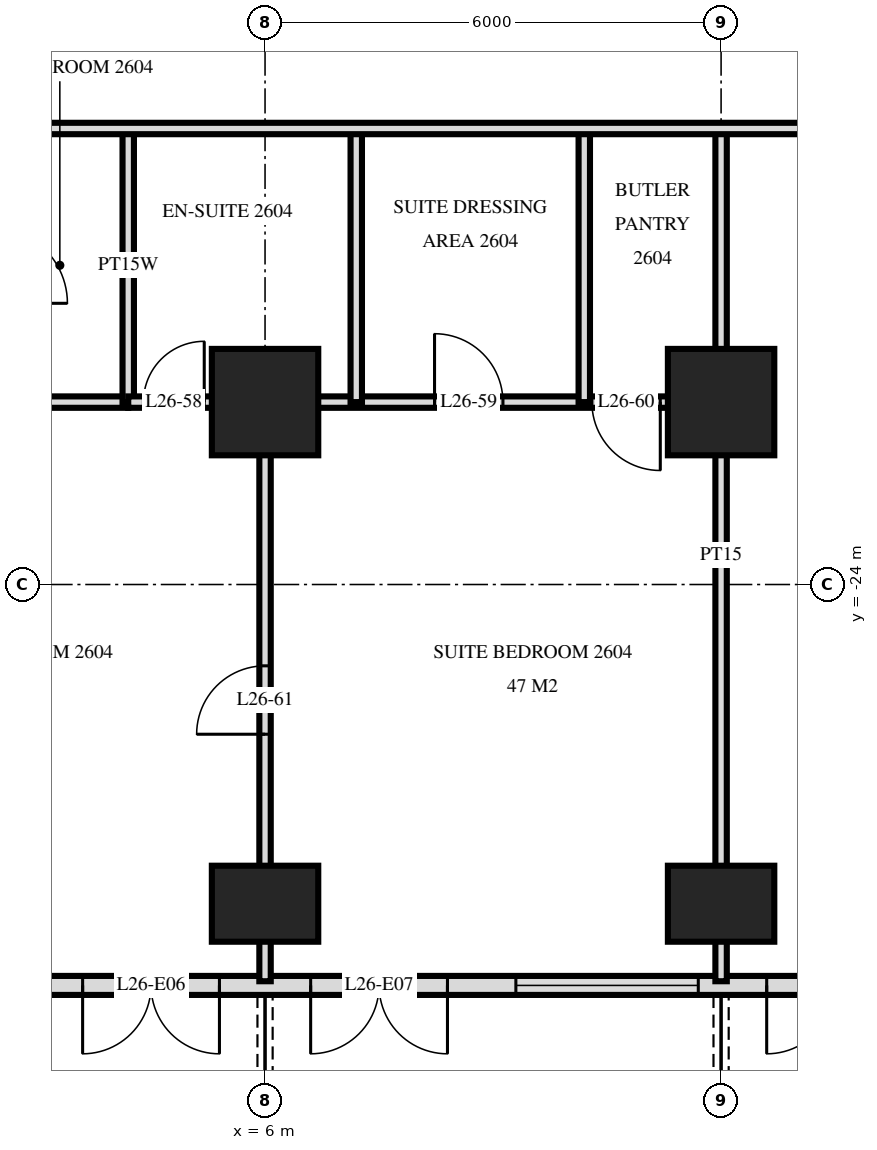
"""IFC4 building model, lengths in metres.
Left out: names, types, materials, properties, quantities, classifications, styles, units other than length and angle.
Written with IfcOpenShell. Run it as: python <this file> out.ifc"""

import sys

from ifc_helpers import new_model, si_unit, direction, frame, frame_2d, origin, origin_2d, place, context, subcontext, project, spatial, rectangle, extrude, element, fill, save


model = new_model("IFC4")
c1 = context("Model", 3, precision=1e-05, world=origin(), true_north=direction((0.0, 1.0)))
c2 = subcontext(c1, "Body", "Model", "MODEL_VIEW")
j1 = project(units=[si_unit("LENGTHUNIT", "METRE"), si_unit("PLANEANGLEUNIT", "RADIAN")], contexts=[c1])
p1 = place(None, origin())
s1 = spatial("IfcSite", under=j1, at=p1, CompositionType="ELEMENT")
p2 = place(p1, origin())
s2 = spatial("IfcBuilding", under=s1, at=p2, CompositionType="ELEMENT")
p3 = place(p2, frame((0.0, 0.0, 103.2)))
s3 = spatial("IfcBuildingStorey", under=s2, at=p3, CompositionType="ELEMENT", Elevation=103.2)
p4 = place(p3, frame((6.0, -28.2, 0.0), z_axis=(0.0, 0.0, 1.0), x_axis=(1.0, 0.0, 0.0)))
e1 = element("IfcColumn", 1, at=p4, inside=s3, PredefinedType="COLUMN", context=c2, shape_type="SweptSolid", body=[
    extrude(rectangle(XDim=1.4, YDim=1.0, at=origin_2d()), origin(), (0.0, 0.0, 1.0), 3.6),
])
p5 = place(p3, frame((6.0, -21.6, 0.0), z_axis=(0.0, 0.0, 1.0), x_axis=(1.0, 0.0, 0.0)))
e2 = element("IfcColumn", 2, at=p5, inside=s3, PredefinedType="COLUMN", context=c2, shape_type="SweptSolid", body=[
    extrude(rectangle(XDim=1.4, YDim=1.4, at=origin_2d()), origin(), (0.0, 0.0, 1.0), 3.6),
])
p6 = place(p3, frame((12.0, -28.2, 0.0), z_axis=(0.0, 0.0, 1.0), x_axis=(1.0, 0.0, 0.0)))
e3 = element("IfcColumn", 3, at=p6, inside=s3, PredefinedType="COLUMN", context=c2, shape_type="SweptSolid", body=[
    extrude(rectangle(XDim=1.4, YDim=1.0, at=origin_2d()), origin(), (0.0, 0.0, 1.0), 3.6),
])
p7 = place(p3, frame((12.0, -21.6, 0.0), z_axis=(0.0, 0.0, 1.0), x_axis=(1.0, 0.0, 0.0)))
e4 = element("IfcColumn", 4, at=p7, inside=s3, PredefinedType="COLUMN", context=c2, shape_type="SweptSolid", body=[
    extrude(rectangle(XDim=1.4, YDim=1.4, at=origin_2d()), origin(), (0.0, 0.0, 1.0), 3.6),
])
p8 = place(p3, frame((-28.775, -29.275, 0.0), z_axis=(0.0, 0.0, 1.0), x_axis=(1.0, 0.0, 0.0)))
e5 = element("IfcWall", 5, at=p8, inside=s3, PredefinedType="SOLIDWALL", context=c2, shape_type="SweptSolid", body=[
    extrude(rectangle(XDim=57.551, YDim=0.25, at=frame_2d((28.775, 0.0))), origin(), (0.0, 0.0, 1.0), 3.3),
])
p9 = place(p8, frame((0.575, 0.0, 0.0)))
e6 = element("IfcOpeningElement", 6, at=p9, cuts=e5, PredefinedType="OPENING", context=c2, shape_type="SweptSolid", body=[
    extrude(rectangle(XDim=1.8, YDim=2.4, at=frame_2d((0.9, 1.2))), frame((0.0, 0.135, 0.0), z_axis=(0.0, -1.0, 0.0), x_axis=(1.0, 0.0, 0.0)), (0.0, 0.0, 1.0), 0.27),
])
p10 = place(p8, frame((5.375, 0.0, 0.0)))
e7 = element("IfcOpeningElement", 7, at=p10, cuts=e5, PredefinedType="OPENING", context=c2, shape_type="SweptSolid", body=[
    extrude(rectangle(XDim=1.8, YDim=2.4, at=frame_2d((0.9, 1.2))), frame((0.0, 0.135, 0.0), z_axis=(0.0, -1.0, 0.0), x_axis=(1.0, 0.0, 0.0)), (0.0, 0.0, 1.0), 0.27),
])
p11 = place(p8, frame((8.075, 0.0, 0.3)))
e8 = element("IfcOpeningElement", 8, at=p11, cuts=e5, PredefinedType="OPENING", context=c2, shape_type="SweptSolid", body=[
    extrude(rectangle(XDim=2.4, YDim=2.1, at=frame_2d((1.2, 1.05))), frame((0.0, 0.135, 0.0), z_axis=(0.0, -1.0, 0.0), x_axis=(1.0, 0.0, 0.0)), (0.0, 0.0, 1.0), 0.27),
])
p12 = place(p8, frame((11.375, 0.0, 0.0)))
e9 = element("IfcOpeningElement", 9, at=p12, cuts=e5, PredefinedType="OPENING", context=c2, shape_type="SweptSolid", body=[
    extrude(rectangle(XDim=1.8, YDim=2.4, at=frame_2d((0.9, 1.2))), frame((0.0, 0.135, 0.0), z_axis=(0.0, -1.0, 0.0), x_axis=(1.0, 0.0, 0.0)), (0.0, 0.0, 1.0), 0.27),
])
p13 = place(p8, frame((14.075, 0.0, 0.3)))
e10 = element("IfcOpeningElement", 10, at=p13, cuts=e5, PredefinedType="OPENING", context=c2, shape_type="SweptSolid", body=[
    extrude(rectangle(XDim=2.4, YDim=2.1, at=frame_2d((1.2, 1.05))), frame((0.0, 0.135, 0.0), z_axis=(0.0, -1.0, 0.0), x_axis=(1.0, 0.0, 0.0)), (0.0, 0.0, 1.0), 0.27),
])
p14 = place(p8, frame((17.375, 0.0, 0.0)))
e11 = element("IfcOpeningElement", 11, at=p14, cuts=e5, PredefinedType="OPENING", context=c2, shape_type="SweptSolid", body=[
    extrude(rectangle(XDim=1.8, YDim=2.4, at=frame_2d((0.9, 1.2))), frame((0.0, 0.135, 0.0), z_axis=(0.0, -1.0, 0.0), x_axis=(1.0, 0.0, 0.0)), (0.0, 0.0, 1.0), 0.27),
])
p15 = place(p8, frame((20.075, 0.0, 0.3)))
e12 = element("IfcOpeningElement", 12, at=p15, cuts=e5, PredefinedType="OPENING", context=c2, shape_type="SweptSolid", body=[
    extrude(rectangle(XDim=2.4, YDim=2.1, at=frame_2d((1.2, 1.05))), frame((0.0, 0.135, 0.0), z_axis=(0.0, -1.0, 0.0), x_axis=(1.0, 0.0, 0.0)), (0.0, 0.0, 1.0), 0.27),
])
p16 = place(p8, frame((23.075, 0.0, 0.3)))
e13 = element("IfcOpeningElement", 13, at=p16, cuts=e5, PredefinedType="OPENING", context=c2, shape_type="SweptSolid", body=[
    extrude(rectangle(XDim=2.4, YDim=2.1, at=frame_2d((1.2, 1.05))), frame((0.0, 0.135, 0.0), z_axis=(0.0, -1.0, 0.0), x_axis=(1.0, 0.0, 0.0)), (0.0, 0.0, 1.0), 0.27),
])
p17 = place(p8, frame((26.375, 0.0, 0.0)))
e14 = element("IfcOpeningElement", 14, at=p17, cuts=e5, PredefinedType="OPENING", context=c2, shape_type="SweptSolid", body=[
    extrude(rectangle(XDim=1.8, YDim=2.4, at=frame_2d((0.9, 1.2))), frame((0.0, 0.135, 0.0), z_axis=(0.0, -1.0, 0.0), x_axis=(1.0, 0.0, 0.0)), (0.0, 0.0, 1.0), 0.27),
])
p18 = place(p8, frame((29.075, 0.0, 0.3)))
e15 = element("IfcOpeningElement", 15, at=p18, cuts=e5, PredefinedType="OPENING", context=c2, shape_type="SweptSolid", body=[
    extrude(rectangle(XDim=2.4, YDim=2.1, at=frame_2d((1.2, 1.05))), frame((0.0, 0.135, 0.0), z_axis=(0.0, -1.0, 0.0), x_axis=(1.0, 0.0, 0.0)), (0.0, 0.0, 1.0), 0.27),
])
p19 = place(p8, frame((32.375, 0.0, 0.0)))
e16 = element("IfcOpeningElement", 16, at=p19, cuts=e5, PredefinedType="OPENING", context=c2, shape_type="SweptSolid", body=[
    extrude(rectangle(XDim=1.8, YDim=2.4, at=frame_2d((0.9, 1.2))), frame((0.0, 0.135, 0.0), z_axis=(0.0, -1.0, 0.0), x_axis=(1.0, 0.0, 0.0)), (0.0, 0.0, 1.0), 0.27),
])
p20 = place(p8, frame((35.375, 0.0, 0.0)))
e17 = element("IfcOpeningElement", 17, at=p20, cuts=e5, PredefinedType="OPENING", context=c2, shape_type="SweptSolid", body=[
    extrude(rectangle(XDim=1.8, YDim=2.4, at=frame_2d((0.9, 1.2))), frame((0.0, 0.135, 0.0), z_axis=(0.0, -1.0, 0.0), x_axis=(1.0, 0.0, 0.0)), (0.0, 0.0, 1.0), 0.27),
])
p21 = place(p8, frame((38.075, 0.0, 0.3)))
e18 = element("IfcOpeningElement", 18, at=p21, cuts=e5, PredefinedType="OPENING", context=c2, shape_type="SweptSolid", body=[
    extrude(rectangle(XDim=2.4, YDim=2.1, at=frame_2d((1.2, 1.05))), frame((0.0, 0.135, 0.0), z_axis=(0.0, -1.0, 0.0), x_axis=(1.0, 0.0, 0.0)), (0.0, 0.0, 1.0), 0.27),
])
p22 = place(p8, frame((41.375, 0.0, 0.0)))
e19 = element("IfcOpeningElement", 19, at=p22, cuts=e5, PredefinedType="OPENING", context=c2, shape_type="SweptSolid", body=[
    extrude(rectangle(XDim=1.8, YDim=2.4, at=frame_2d((0.9, 1.2))), frame((0.0, 0.135, 0.0), z_axis=(0.0, -1.0, 0.0), x_axis=(1.0, 0.0, 0.0)), (0.0, 0.0, 1.0), 0.27),
])
p23 = place(p8, frame((44.075, 0.0, 0.3)))
e20 = element("IfcOpeningElement", 20, at=p23, cuts=e5, PredefinedType="OPENING", context=c2, shape_type="SweptSolid", body=[
    extrude(rectangle(XDim=2.4, YDim=2.1, at=frame_2d((1.2, 1.05))), frame((0.0, 0.135, 0.0), z_axis=(0.0, -1.0, 0.0), x_axis=(1.0, 0.0, 0.0)), (0.0, 0.0, 1.0), 0.27),
])
p24 = place(p8, frame((47.075, 0.0, 0.3)))
e21 = element("IfcOpeningElement", 21, at=p24, cuts=e5, PredefinedType="OPENING", context=c2, shape_type="SweptSolid", body=[
    extrude(rectangle(XDim=2.4, YDim=2.1, at=frame_2d((1.2, 1.05))), frame((0.0, 0.135, 0.0), z_axis=(0.0, -1.0, 0.0), x_axis=(1.0, 0.0, 0.0)), (0.0, 0.0, 1.0), 0.27),
])
p25 = place(p8, frame((50.375, 0.0, 0.0)))
e22 = element("IfcOpeningElement", 22, at=p25, cuts=e5, PredefinedType="OPENING", context=c2, shape_type="SweptSolid", body=[
    extrude(rectangle(XDim=1.8, YDim=2.4, at=frame_2d((0.9, 1.2))), frame((0.0, 0.135, 0.0), z_axis=(0.0, -1.0, 0.0), x_axis=(1.0, 0.0, 0.0)), (0.0, 0.0, 1.0), 0.27),
])
p26 = place(p8, frame((53.375, 0.0, 0.0)))
e23 = element("IfcOpeningElement", 23, at=p26, cuts=e5, PredefinedType="OPENING", context=c2, shape_type="SweptSolid", body=[
    extrude(rectangle(XDim=1.8, YDim=2.4, at=frame_2d((0.9, 1.2))), frame((0.0, 0.135, 0.0), z_axis=(0.0, -1.0, 0.0), x_axis=(1.0, 0.0, 0.0)), (0.0, 0.0, 1.0), 0.27),
])
p27 = place(p3, frame((12.0, -29.22, 0.0), z_axis=(0.0, 0.0, 1.0), x_axis=(0.0, 1.0, 0.0)))
e24 = element("IfcWall", 24, at=p27, inside=s3, PredefinedType="PARTITIONING", context=c2, shape_type="SweptSolid", body=[
    extrude(rectangle(XDim=11.22, YDim=0.15, at=frame_2d((5.61, 0.0))), origin(), (0.0, 0.0, 1.0), 3.32),
])
for number, where, z_axis, x_axis in (
    (25, (10.2, -21.6, 0.0), (0.0, 0.0, 1.0), (0.0, 1.0, 0.0)),
    (26, (7.2, -21.6, 0.0), (0.0, 0.0, 1.0), (0.0, 1.0, 0.0)),
):
    element("IfcWall", number, at=place(p3, frame(where, z_axis=z_axis, x_axis=x_axis)), inside=s3, PredefinedType="PARTITIONING", context=c2, shape_type="SweptSolid", body=[
        extrude(rectangle(XDim=3.6, YDim=0.15, at=frame_2d((1.8, 0.0))), origin(), (0.0, 0.0, 1.0), 3.32),
    ])
p28 = place(p3, frame((6.0, -29.22, 0.0), z_axis=(0.0, 0.0, 1.0), x_axis=(0.0, 1.0, 0.0)))
e27 = element("IfcWall", 27, at=p28, inside=s3, PredefinedType="PARTITIONING", context=c2, shape_type="SweptSolid", body=[
    extrude(rectangle(XDim=7.62, YDim=0.15, at=frame_2d((3.81, 0.0))), origin(), (0.0, 0.0, 1.0), 3.32),
])
p29 = place(p28, frame((3.25, 0.0, 0.0)))
e28 = element("IfcOpeningElement", 28, at=p29, cuts=e27, PredefinedType="OPENING", context=c2, shape_type="SweptSolid", body=[
    extrude(rectangle(XDim=0.9, YDim=2.1, at=frame_2d((0.45, 1.05))), frame((0.0, 0.085, 0.0), z_axis=(0.0, -1.0, 0.0), x_axis=(1.0, 0.0, 0.0)), (0.0, 0.0, 1.0), 0.17),
])
p30 = place(p3, frame((4.2, -21.6, 0.0), z_axis=(0.0, 0.0, 1.0), x_axis=(0.0, 1.0, 0.0)))
e29 = element("IfcWall", 29, at=p30, inside=s3, PredefinedType="PLUMBINGWALL", context=c2, shape_type="SweptSolid", body=[
    extrude(rectangle(XDim=3.6, YDim=0.15, at=frame_2d((1.8, 0.0))), origin(), (0.0, 0.0, 1.0), 3.32),
])
p31 = place(p3, frame((4.2, -21.6, 0.0), z_axis=(0.0, 0.0, 1.0), x_axis=(1.0, 0.0, 0.0)))
e30 = element("IfcWall", 30, at=p31, inside=s3, PredefinedType="PARTITIONING", context=c2, shape_type="SweptSolid", body=[
    extrude(rectangle(XDim=7.8, YDim=0.15, at=frame_2d((3.9, 0.0))), origin(), (0.0, 0.0, 1.0), 3.32),
])
p32 = place(p31, frame((0.2, 0.0, 0.0)))
e31 = element("IfcOpeningElement", 31, at=p32, cuts=e30, PredefinedType="OPENING", context=c2, shape_type="SweptSolid", body=[
    extrude(rectangle(XDim=0.8, YDim=2.1, at=frame_2d((0.4, 1.05))), frame((0.0, 0.085, 0.0), z_axis=(0.0, -1.0, 0.0), x_axis=(1.0, 0.0, 0.0)), (0.0, 0.0, 1.0), 0.17),
])
p33 = place(p31, frame((4.03, 0.0, 0.0)))
e32 = element("IfcOpeningElement", 32, at=p33, cuts=e30, PredefinedType="OPENING", context=c2, shape_type="SweptSolid", body=[
    extrude(rectangle(XDim=0.9, YDim=2.1, at=frame_2d((0.45, 1.05))), frame((0.0, 0.085, 0.0), z_axis=(0.0, -1.0, 0.0), x_axis=(1.0, 0.0, 0.0)), (0.0, 0.0, 1.0), 0.17),
])
p34 = place(p31, frame((6.1, 0.0, 0.0)))
e33 = element("IfcOpeningElement", 33, at=p34, cuts=e30, PredefinedType="OPENING", context=c2, shape_type="SweptSolid", body=[
    extrude(rectangle(XDim=0.9, YDim=2.1, at=frame_2d((0.45, 1.05))), frame((0.0, 0.085, 0.0), z_axis=(0.0, -1.0, 0.0), x_axis=(1.0, 0.0, 0.0)), (0.0, 0.0, 1.0), 0.17),
])
p35 = place(p3, frame((2.4, -21.6, 0.0), z_axis=(0.0, 0.0, 1.0), x_axis=(1.0, 0.0, 0.0)))
e34 = element("IfcWall", 34, at=p35, inside=s3, PredefinedType="PLUMBINGWALL", context=c2, shape_type="SweptSolid", body=[
    extrude(rectangle(XDim=1.8, YDim=0.15, at=frame_2d((0.9, 0.0))), origin(), (0.0, 0.0, 1.0), 3.32),
])
p36 = place(p3, frame((-33.12, -18.0, 0.0), z_axis=(0.0, 0.0, 1.0), x_axis=(1.0, 0.0, 0.0)))
e35 = element("IfcWall", 35, at=p36, inside=s3, PredefinedType="PARTITIONING", context=c2, shape_type="SweptSolid", body=[
    extrude(rectangle(XDim=66.24, YDim=0.15, at=frame_2d((33.12, 0.0))), origin(), (0.0, 0.0, 1.0), 3.32),
])
p37 = place(p36, frame((14.02, 0.0, 0.0)))
e36 = element("IfcOpeningElement", 36, at=p37, cuts=e35, PredefinedType="OPENING", context=c2, shape_type="SweptSolid", body=[
    extrude(rectangle(XDim=1.0, YDim=2.1, at=frame_2d((0.5, 1.05))), frame((0.0, 0.085, 0.0), z_axis=(0.0, -1.0, 0.0), x_axis=(1.0, 0.0, 0.0)), (0.0, 0.0, 1.0), 0.17),
])
p38 = place(p36, frame((18.82, 0.0, 0.0)))
e37 = element("IfcOpeningElement", 37, at=p38, cuts=e35, PredefinedType="OPENING", context=c2, shape_type="SweptSolid", body=[
    extrude(rectangle(XDim=1.0, YDim=2.1, at=frame_2d((0.5, 1.05))), frame((0.0, 0.085, 0.0), z_axis=(0.0, -1.0, 0.0), x_axis=(1.0, 0.0, 0.0)), (0.0, 0.0, 1.0), 0.17),
])
p39 = place(p36, frame((30.27, 0.0, 0.0)))
e38 = element("IfcOpeningElement", 38, at=p39, cuts=e35, PredefinedType="OPENING", context=c2, shape_type="SweptSolid", body=[
    extrude(rectangle(XDim=1.0, YDim=2.1, at=frame_2d((0.5, 1.05))), frame((0.0, 0.085, 0.0), z_axis=(0.0, -1.0, 0.0), x_axis=(1.0, 0.0, 0.0)), (0.0, 0.0, 1.0), 0.17),
])
p40 = place(p36, frame((33.82, 0.0, 0.0)))
e39 = element("IfcOpeningElement", 39, at=p40, cuts=e35, PredefinedType="OPENING", context=c2, shape_type="SweptSolid", body=[
    extrude(rectangle(XDim=1.0, YDim=2.1, at=frame_2d((0.5, 1.05))), frame((0.0, 0.085, 0.0), z_axis=(0.0, -1.0, 0.0), x_axis=(1.0, 0.0, 0.0)), (0.0, 0.0, 1.0), 0.17),
])
p41 = place(p36, frame((46.27, 0.0, 0.0)))
e40 = element("IfcOpeningElement", 40, at=p41, cuts=e35, PredefinedType="OPENING", context=c2, shape_type="SweptSolid", body=[
    extrude(rectangle(XDim=1.0, YDim=2.1, at=frame_2d((0.5, 1.05))), frame((0.0, 0.085, 0.0), z_axis=(0.0, -1.0, 0.0), x_axis=(1.0, 0.0, 0.0)), (0.0, 0.0, 1.0), 0.17),
])
p42 = place(p36, frame((6.07, 0.0, 0.0)))
e41 = element("IfcOpeningElement", 41, at=p42, cuts=e35, PredefinedType="OPENING", context=c2, shape_type="SweptSolid", body=[
    extrude(rectangle(XDim=1.0, YDim=2.1, at=frame_2d((0.5, 1.05))), frame((0.0, 0.085, 0.0), z_axis=(0.0, -1.0, 0.0), x_axis=(1.0, 0.0, 0.0)), (0.0, 0.0, 1.0), 0.17),
])
p43 = place(p36, frame((60.37, 0.0, 0.0)))
e42 = element("IfcOpeningElement", 42, at=p43, cuts=e35, PredefinedType="OPENING", context=c2, shape_type="SweptSolid", body=[
    extrude(rectangle(XDim=1.0, YDim=2.1, at=frame_2d((0.5, 1.05))), frame((0.0, 0.085, 0.0), z_axis=(0.0, -1.0, 0.0), x_axis=(1.0, 0.0, 0.0)), (0.0, 0.0, 1.0), 0.17),
])
p44 = place(p19, frame((0.9, 0.0, 0.0), z_axis=(0.0, 0.0, 1.0), x_axis=(-1.0, 0.0, 0.0)))
e43 = element("IfcDoor", 43, at=p44, inside=s3, OperationType="DOUBLE_DOOR_SINGLE_SWING", PredefinedType="DOOR", context=c2, shape_type="SweptSolid", body=[
    extrude(rectangle(XDim=1.8, YDim=2.4, at=frame_2d((0.0, 1.2))), frame((0.0, -0.025, 0.0), z_axis=(0.0, 1.0, 0.0), x_axis=(-1.0, 0.0, 0.0)), (0.0, 0.0, 1.0), 0.05),
])
fill(e16, e43)
p45 = place(p20, frame((0.9, 0.0, 0.0), z_axis=(0.0, 0.0, 1.0), x_axis=(-1.0, 0.0, 0.0)))
e44 = element("IfcDoor", 44, at=p45, inside=s3, OperationType="DOUBLE_DOOR_SINGLE_SWING", PredefinedType="DOOR", context=c2, shape_type="SweptSolid", body=[
    extrude(rectangle(XDim=1.8, YDim=2.4, at=frame_2d((0.0, 1.2))), frame((0.0, -0.025, 0.0), z_axis=(0.0, 1.0, 0.0), x_axis=(-1.0, 0.0, 0.0)), (0.0, 0.0, 1.0), 0.05),
])
fill(e17, e44)
p46 = place(p21, origin())
e45 = element("IfcWindow", 45, at=p46, inside=s3, PartitioningType="SINGLE_PANEL", PredefinedType="WINDOW", context=c2, shape_type="SweptSolid", body=[
    extrude(rectangle(XDim=2.4, YDim=2.1, at=frame_2d((1.2, 1.05))), frame((0.0, 0.03, 0.0), z_axis=(0.0, -1.0, 0.0), x_axis=(1.0, 0.0, 0.0)), (0.0, 0.0, 1.0), 0.06),
])
fill(e18, e45)
p47 = place(p22, frame((0.9, 0.0, 0.0), z_axis=(0.0, 0.0, 1.0), x_axis=(-1.0, 0.0, 0.0)))
e46 = element("IfcDoor", 46, at=p47, inside=s3, OperationType="DOUBLE_DOOR_SINGLE_SWING", PredefinedType="DOOR", context=c2, shape_type="SweptSolid", body=[
    extrude(rectangle(XDim=1.8, YDim=2.4, at=frame_2d((0.0, 1.2))), frame((0.0, -0.025, 0.0), z_axis=(0.0, 1.0, 0.0), x_axis=(-1.0, 0.0, 0.0)), (0.0, 0.0, 1.0), 0.05),
])
fill(e19, e46)
p48 = place(p32, origin())
e47 = element("IfcDoor", 47, at=p48, inside=s3, OperationType="SINGLE_SWING_LEFT", PredefinedType="DOOR", context=c2, shape_type="SweptSolid", body=[
    extrude(rectangle(XDim=0.8, YDim=2.1, at=frame_2d((0.4, 1.05))), frame((0.0, 0.025, 0.0), z_axis=(0.0, -1.0, 0.0), x_axis=(1.0, 0.0, 0.0)), (0.0, 0.0, 1.0), 0.05),
])
fill(e31, e47)
p49 = place(p33, origin())
e48 = element("IfcDoor", 48, at=p49, inside=s3, OperationType="SINGLE_SWING_RIGHT", PredefinedType="DOOR", context=c2, shape_type="SweptSolid", body=[
    extrude(rectangle(XDim=0.9, YDim=2.1, at=frame_2d((0.45, 1.05))), frame((0.0, 0.025, 0.0), z_axis=(0.0, -1.0, 0.0), x_axis=(1.0, 0.0, 0.0)), (0.0, 0.0, 1.0), 0.05),
])
fill(e32, e48)
p50 = place(p34, frame((0.45, 0.0, 0.0), z_axis=(0.0, 0.0, 1.0), x_axis=(-1.0, 0.0, 0.0)))
e49 = element("IfcDoor", 49, at=p50, inside=s3, OperationType="SINGLE_SWING_RIGHT", PredefinedType="DOOR", context=c2, shape_type="SweptSolid", body=[
    extrude(rectangle(XDim=0.9, YDim=2.1, at=frame_2d((0.0, 1.05))), frame((0.0, -0.025, 0.0), z_axis=(0.0, 1.0, 0.0), x_axis=(-1.0, 0.0, 0.0)), (0.0, 0.0, 1.0), 0.05),
])
fill(e33, e49)
p51 = place(p29, origin())
e50 = element("IfcDoor", 50, at=p51, inside=s3, OperationType="SINGLE_SWING_RIGHT", PredefinedType="DOOR", context=c2, shape_type="SweptSolid", body=[
    extrude(rectangle(XDim=0.9, YDim=2.1, at=frame_2d((0.45, 1.05))), frame((0.0, 0.025, 0.0), z_axis=(0.0, -1.0, 0.0), x_axis=(1.0, 0.0, 0.0)), (0.0, 0.0, 1.0), 0.05),
])
fill(e28, e50)
save(model, sys.argv[1])
